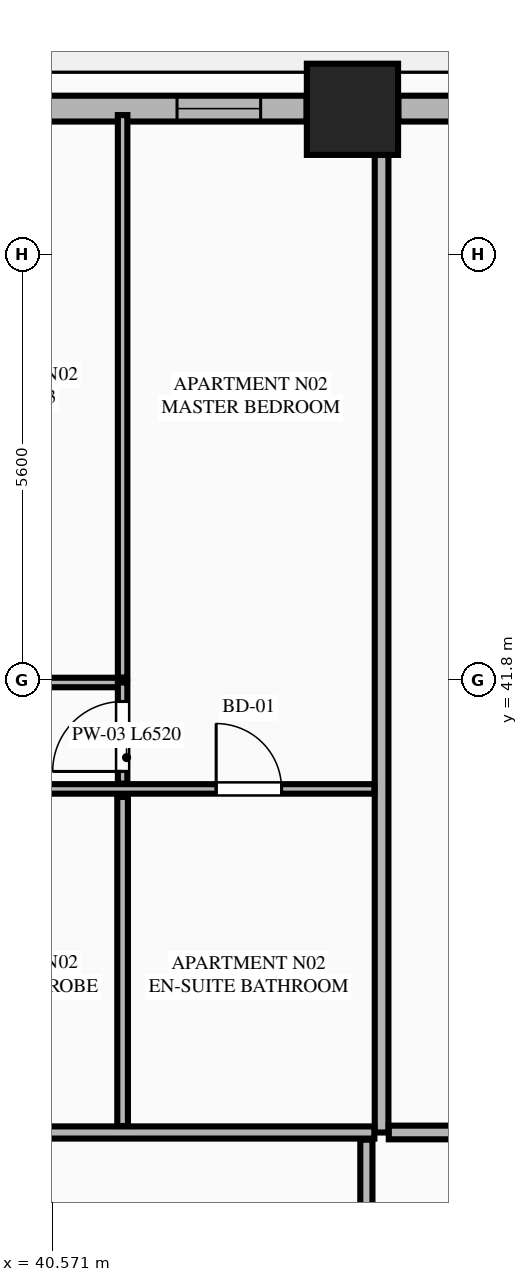
"""IFC4 building model, lengths in metres.
Left out: names, types, materials, properties, quantities, classifications, styles, units other than length and angle.
Written with IfcOpenShell. Run it as: python <this file> out.ifc"""

import sys

from ifc_helpers import new_model, si_unit, direction, frame, frame_2d, origin, origin_2d, place, context, subcontext, project, spatial, rectangle, extrude, element, fill, save


model = new_model("IFC4")
c1 = context("Model", 3, precision=1e-05, world=origin(), true_north=direction((0.0, 1.0)))
c2 = subcontext(c1, "Body", "Model", "MODEL_VIEW")
j1 = project(units=[si_unit("LENGTHUNIT", "METRE"), si_unit("PLANEANGLEUNIT", "RADIAN")], contexts=[c1])
p1 = place(None, origin())
s1 = spatial("IfcSite", under=j1, at=p1, CompositionType="ELEMENT")
p2 = place(p1, origin())
s2 = spatial("IfcBuilding", under=s1, at=p2, CompositionType="ELEMENT")
p3 = place(p2, frame((0.0, 0.0, 49.75)))
s3 = spatial("IfcBuildingStorey", under=s2, at=p3, CompositionType="ELEMENT", Elevation=49.75)
p4 = place(p3, frame((44.517, 49.311, 0.0), z_axis=(0.0, 0.0, 1.0), x_axis=(1.0, 0.0, 0.0)))
e1 = element("IfcColumn", 1, at=p4, inside=s3, PredefinedType="COLUMN", context=c2, shape_type="SweptSolid", body=[
    extrude(rectangle(XDim=1.2, YDim=1.2, at=origin_2d()), origin(), (0.0, 0.0, 1.0), 3.55),
])
p5 = place(p3, frame((46.366, 49.32, 0.0), z_axis=(0.0, 0.0, 1.0), x_axis=(-1.0, 0.0, 0.0)))
e2 = element("IfcWall", 2, at=p5, inside=s3, PredefinedType="STANDARD", context=c2, shape_type="SweptSolid", body=[
    extrude(rectangle(XDim=1.245, YDim=0.34, at=frame_2d((0.623, 0.0))), origin(), (0.0, 0.0, 1.0), 3.33),
])
p6 = place(p3, frame((43.913, 49.32, 0.0), z_axis=(0.0, 0.0, 1.0), x_axis=(-1.0, 0.0, 0.0)))
e3 = element("IfcWall", 3, at=p6, inside=s3, PredefinedType="STANDARD", context=c2, shape_type="SweptSolid", body=[
    extrude(rectangle(XDim=6.787, YDim=0.34, at=frame_2d((3.394, 0.0))), origin(), (0.0, 0.0, 1.0), 2.787),
])
p7 = place(p6, frame((0.604, 0.0, 0.75)))
e4 = element("IfcOpeningElement", 4, at=p7, cuts=e3, PredefinedType="OPENING", context=c2, shape_type="SweptSolid", body=[
    extrude(rectangle(XDim=1.1, YDim=1.887, at=frame_2d((0.55, 0.943))), frame((0.0, 0.18, 0.0), z_axis=(0.0, -1.0, 0.0), x_axis=(1.0, 0.0, 0.0)), (0.0, 0.0, 1.0), 0.36),
])
p8 = place(p6, frame((3.474, 0.0, 0.75)))
e5 = element("IfcOpeningElement", 5, at=p8, cuts=e3, PredefinedType="OPENING", context=c2, shape_type="SweptSolid", body=[
    extrude(rectangle(XDim=1.1, YDim=1.887, at=frame_2d((0.55, 0.943))), frame((0.0, 0.18, 0.0), z_axis=(0.0, -1.0, 0.0), x_axis=(1.0, 0.0, 0.0)), (0.0, 0.0, 1.0), 0.36),
])
p9 = place(p6, frame((5.861, 0.0, 0.75)))
e6 = element("IfcOpeningElement", 6, at=p9, cuts=e3, PredefinedType="OPENING", context=c2, shape_type="SweptSolid", body=[
    extrude(rectangle(XDim=0.716, YDim=1.887, at=frame_2d((0.358, 0.943))), frame((0.0, 0.18, 0.0), z_axis=(0.0, -1.0, 0.0), x_axis=(1.0, 0.0, 0.0)), (0.0, 0.0, 1.0), 0.36),
])
p10 = place(p3, frame((44.9, 35.85, 0.0), z_axis=(0.0, 0.0, 1.0), x_axis=(0.0, 1.0, 0.0)))
e7 = element("IfcWall", 7, at=p10, inside=s3, PredefinedType="PARTITIONING", context=c2, shape_type="SweptSolid", body=[
    extrude(rectangle(XDim=13.295, YDim=0.18, at=frame_2d((6.647, 0.0))), origin(), (0.0, 0.0, 1.0), 3.33),
])
p11 = place(p3, frame((28.373, 35.85, 0.0), z_axis=(0.0, 0.0, 1.0), x_axis=(1.0, 0.0, 0.0)))
e8 = element("IfcWall", 8, at=p11, inside=s3, PredefinedType="PARTITIONING", context=c2, shape_type="SweptSolid", body=[
    extrude(rectangle(XDim=16.432, YDim=0.16, at=frame_2d((8.216, 0.0))), origin(), (0.0, 0.0, 1.0), 3.33),
])
p12 = place(p11, frame((0.355, 0.0, 0.0)))
e9 = element("IfcOpeningElement", 9, at=p12, cuts=e8, PredefinedType="OPENING", context=c2, shape_type="SweptSolid", body=[
    extrude(rectangle(XDim=1.35, YDim=2.35, at=frame_2d((0.675, 1.175))), frame((0.0, 0.09, 0.0), z_axis=(0.0, -1.0, 0.0), x_axis=(1.0, 0.0, 0.0)), (0.0, 0.0, 1.0), 0.18),
])
p13 = place(p3, frame((38.285, 40.37, 0.0), z_axis=(0.0, 0.0, 1.0), x_axis=(1.0, 0.0, 0.0)))
e10 = element("IfcWall", 10, at=p13, inside=s3, PredefinedType="PARTITIONING", context=c2, shape_type="SweptSolid", body=[
    extrude(rectangle(XDim=6.52, YDim=0.125, at=frame_2d((3.26, 0.0))), origin(), (0.0, 0.0, 1.0), 3.33),
])
p14 = place(p13, frame((4.439, 0.0, 0.0)))
e11 = element("IfcOpeningElement", 11, at=p14, cuts=e10, PredefinedType="OPENING", context=c2, shape_type="SweptSolid", body=[
    extrude(rectangle(XDim=0.86, YDim=2.1, at=frame_2d((0.43, 1.05))), frame((0.0, 0.073, 0.0), z_axis=(0.0, -1.0, 0.0), x_axis=(1.0, 0.0, 0.0)), (0.0, 0.0, 1.0), 0.145),
])
p15 = place(p13, frame((0.3, 0.0, 0.0)))
e12 = element("IfcOpeningElement", 12, at=p15, cuts=e10, PredefinedType="OPENING", context=c2, shape_type="SweptSolid", body=[
    extrude(rectangle(XDim=0.88, YDim=2.15, at=frame_2d((0.44, 1.075))), frame((0.0, 0.073, 0.0), z_axis=(0.0, -1.0, 0.0), x_axis=(1.0, 0.0, 0.0)), (0.0, 0.0, 1.0), 0.145),
])
p16 = place(p3, frame((34.878, 41.77, 0.0), z_axis=(0.0, 0.0, 1.0), x_axis=(1.0, 0.0, 0.0)))
e13 = element("IfcWall", 13, at=p16, inside=s3, PredefinedType="PARTITIONING", context=c2, shape_type="SweptSolid", body=[
    extrude(rectangle(XDim=6.615, YDim=0.125, at=frame_2d((3.308, 0.0))), origin(), (0.0, 0.0, 1.0), 3.33),
])
p17 = place(p16, frame((0.35, 0.0, 0.0)))
e14 = element("IfcOpeningElement", 14, at=p17, cuts=e13, PredefinedType="OPENING", context=c2, shape_type="SweptSolid", body=[
    extrude(rectangle(XDim=0.92, YDim=2.15, at=frame_2d((0.46, 1.075))), frame((0.0, 0.073, 0.0), z_axis=(0.0, -1.0, 0.0), x_axis=(1.0, 0.0, 0.0)), (0.0, 0.0, 1.0), 0.145),
])
p18 = place(p16, frame((3.757, 0.0, 0.0)))
e15 = element("IfcOpeningElement", 15, at=p18, cuts=e13, PredefinedType="OPENING", context=c2, shape_type="SweptSolid", body=[
    extrude(rectangle(XDim=0.92, YDim=2.15, at=frame_2d((0.46, 1.075))), frame((0.0, 0.073, 0.0), z_axis=(0.0, -1.0, 0.0), x_axis=(1.0, 0.0, 0.0)), (0.0, 0.0, 1.0), 0.145),
])
p19 = place(p3, frame((41.493, 40.44, 0.0), z_axis=(0.0, 0.0, 1.0), x_axis=(0.0, 1.0, 0.0)))
e16 = element("IfcWall", 16, at=p19, inside=s3, PredefinedType="PARTITIONING", context=c2, shape_type="SweptSolid", body=[
    extrude(rectangle(XDim=1.33, YDim=0.125, at=frame_2d((0.665, 0.0))), origin(), (0.0, 0.0, 1.0), 3.33),
])
p20 = place(p19, frame((0.16, 0.0, 0.0)))
e17 = element("IfcOpeningElement", 17, at=p20, cuts=e16, PredefinedType="OPENING", context=c2, shape_type="SweptSolid", body=[
    extrude(rectangle(XDim=0.92, YDim=2.15, at=frame_2d((0.46, 1.075))), frame((0.0, 0.073, 0.0), z_axis=(0.0, -1.0, 0.0), x_axis=(1.0, 0.0, 0.0)), (0.0, 0.0, 1.0), 0.145),
])
p21 = place(p3, frame((41.493, 41.835, 0.0), z_axis=(0.0, 0.0, 1.0), x_axis=(0.0, 1.0, 0.0)))
e18 = element("IfcWall", 18, at=p21, inside=s3, PredefinedType="PARTITIONING", context=c2, shape_type="SweptSolid", body=[
    extrude(rectangle(XDim=7.4, YDim=0.125, at=frame_2d((3.7, 0.0))), origin(), (0.0, 0.0, 1.0), 3.33),
])
p22 = place(p3, frame((41.493, 35.935, 0.0), z_axis=(0.0, 0.0, 1.0), x_axis=(0.0, 1.0, 0.0)))
e19 = element("IfcWall", 19, at=p22, inside=s3, PredefinedType="PLUMBINGWALL", context=c2, shape_type="SweptSolid", body=[
    extrude(rectangle(XDim=4.33, YDim=0.14, at=frame_2d((2.165, 0.0))), origin(), (0.0, 0.0, 1.0), 3.33),
])
p23 = place(p3, frame((44.995, 35.85, 0.0), z_axis=(0.0, 0.0, 1.0), x_axis=(1.0, 0.0, 0.0)))
e20 = element("IfcWall", 20, at=p23, inside=s3, PredefinedType="PARTITIONING", context=c2, shape_type="SweptSolid", body=[
    extrude(rectangle(XDim=9.14, YDim=0.18, at=frame_2d((4.57, 0.0))), origin(), (0.0, 0.0, 1.0), 3.33),
])
p24 = place(p3, frame((44.7, 16.045, 0.0), z_axis=(0.0, 0.0, 1.0), x_axis=(0.0, 1.0, 0.0)))
e21 = element("IfcWall", 21, at=p24, inside=s3, PredefinedType="PARTITIONING", context=c2, shape_type="SweptSolid", body=[
    extrude(rectangle(XDim=19.71, YDim=0.16, at=frame_2d((9.855, 0.0))), origin(), (0.0, 0.0, 1.0), 2.7),
])
p25 = place(p24, frame((0.45, 0.0, 0.0)))
e22 = element("IfcOpeningElement", 22, at=p25, cuts=e21, PredefinedType="OPENING", context=c2, shape_type="SweptSolid", body=[
    extrude(rectangle(XDim=1.02, YDim=2.25, at=frame_2d((0.51, 1.125))), frame((0.0, 0.09, 0.0), z_axis=(0.0, -1.0, 0.0), x_axis=(1.0, 0.0, 0.0)), (0.0, 0.0, 1.0), 0.18),
])
p26 = place(p7, origin())
e23 = element("IfcWindow", 23, at=p26, inside=s3, PartitioningType="SINGLE_PANEL", PredefinedType="WINDOW", context=c2, shape_type="SweptSolid", body=[
    extrude(rectangle(XDim=1.1, YDim=1.887, at=frame_2d((0.55, 0.943))), frame((0.0, 0.03, 0.0), z_axis=(0.0, -1.0, 0.0), x_axis=(1.0, 0.0, 0.0)), (0.0, 0.0, 1.0), 0.06),
])
fill(e4, e23)
p27 = place(p14, origin())
e24 = element("IfcDoor", 24, at=p27, inside=s3, OperationType="SINGLE_SWING_LEFT", PredefinedType="DOOR", context=c2, shape_type="SweptSolid", body=[
    extrude(rectangle(XDim=0.86, YDim=2.1, at=frame_2d((0.43, 1.05))), frame((0.0, 0.025, 0.0), z_axis=(0.0, -1.0, 0.0), x_axis=(1.0, 0.0, 0.0)), (0.0, 0.0, 1.0), 0.05),
])
fill(e11, e24)
p28 = place(p20, origin())
e25 = element("IfcDoor", 25, at=p28, inside=s3, OperationType="SINGLE_SWING_LEFT", PredefinedType="DOOR", context=c2, shape_type="SweptSolid", body=[
    extrude(rectangle(XDim=0.92, YDim=2.15, at=frame_2d((0.46, 1.075))), frame((0.0, 0.025, 0.0), z_axis=(0.0, -1.0, 0.0), x_axis=(1.0, 0.0, 0.0)), (0.0, 0.0, 1.0), 0.05),
])
fill(e17, e25)
save(model, sys.argv[1])
